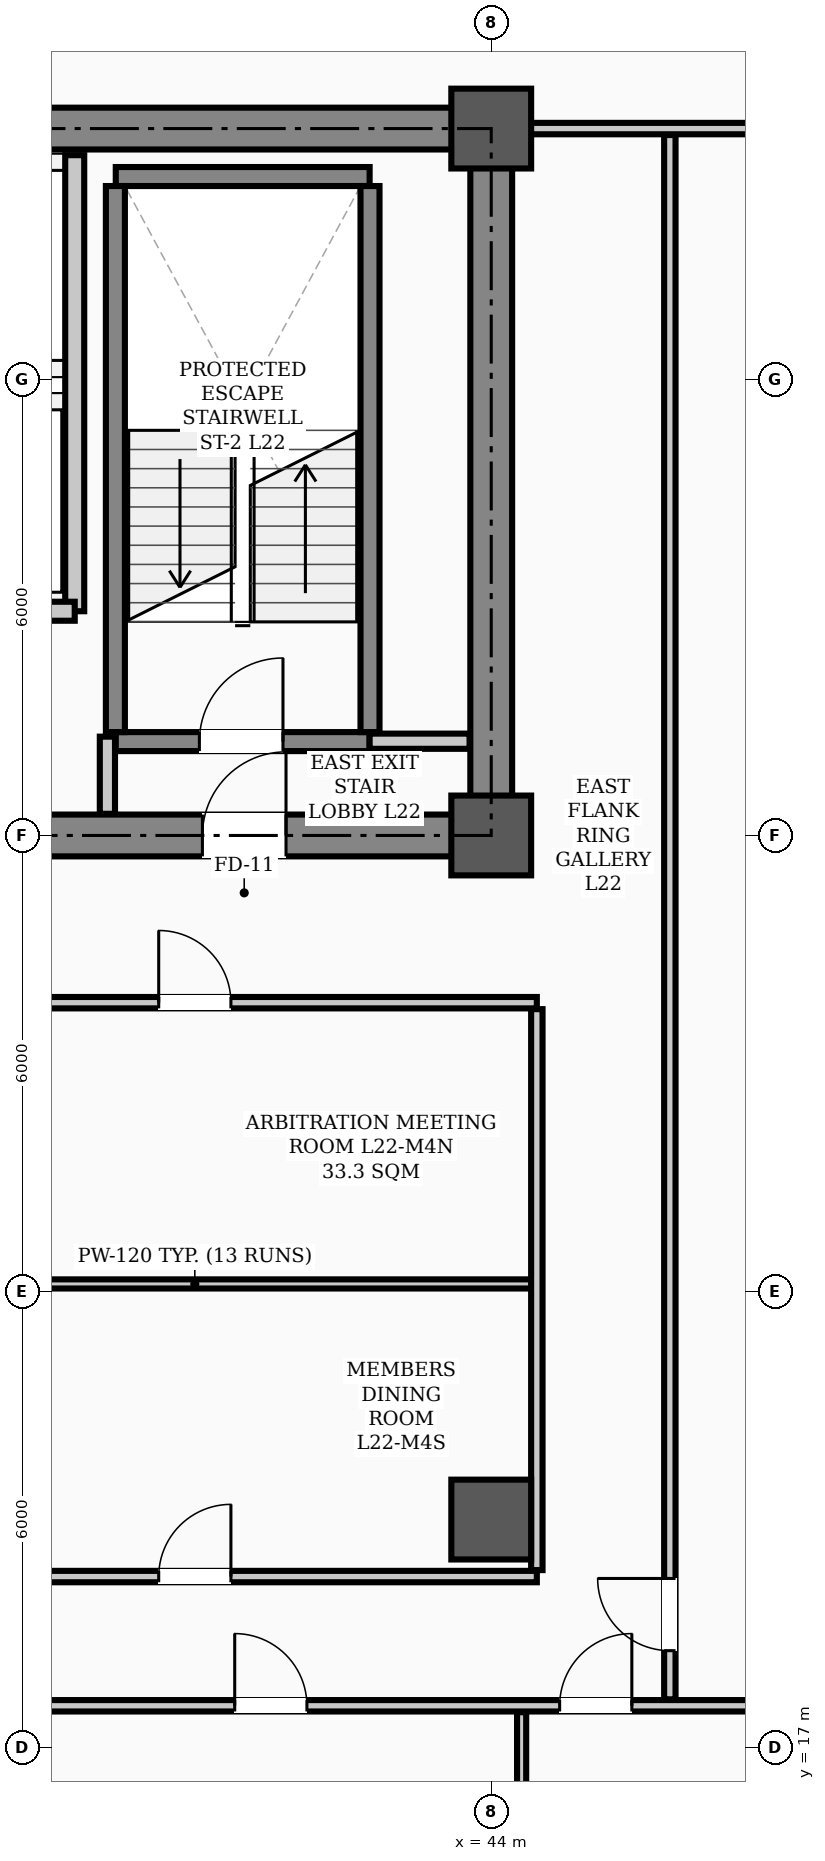
"""IFC4 building model, lengths in metres.
Left out: names, types, materials, properties, quantities, classifications, styles, units other than length and angle.
Written with IfcOpenShell. Run it as: python <this file> out.ifc"""

import sys

from ifc_helpers import new_model, si_unit, direction, frame, frame_2d, origin, origin_2d, place, context, subcontext, project, spatial, rectangle, hollow_rectangle, extrude, element, fill, save


model = new_model("IFC4")
c1 = context("Model", 3, precision=1e-05, world=origin(), true_north=direction((0.0, 1.0)))
c2 = subcontext(c1, "Body", "Model", "MODEL_VIEW")
j1 = project(units=[si_unit("LENGTHUNIT", "METRE"), si_unit("PLANEANGLEUNIT", "RADIAN")], contexts=[c1])
p1 = place(None, origin())
s1 = spatial("IfcSite", under=j1, at=p1, CompositionType="ELEMENT")
p2 = place(p1, origin())
s2 = spatial("IfcBuilding", under=s1, at=p2, CompositionType="ELEMENT")
p3 = place(p2, frame((0.0, 0.0, 88.9)))
s3 = spatial("IfcBuildingStorey", under=s2, at=p3, CompositionType="ELEMENT", Elevation=88.9)
for number, where, z_axis, x_axis in (
    (1, (44.0, 29.0, 0.0), (0.0, 0.0, 1.0), (1.0, 0.0, 0.0)),
    (2, (44.0, 38.3, 0.0), (0.0, 0.0, 1.0), (1.0, 0.0, 0.0)),
    (3, (44.0, 20.0, 0.0), (0.0, 0.0, 1.0), (1.0, 0.0, 0.0)),
):
    element("IfcColumn", number, at=place(p3, frame(where, z_axis=z_axis, x_axis=x_axis)), inside=s3, PredefinedType="COLUMN", context=c2, shape_type="SweptSolid", body=[
        extrude(hollow_rectangle(XDim=1.05, YDim=1.05, WallThickness=0.038, InnerFilletRadius=0.019, OuterFilletRadius=0.057, at=origin_2d()), origin(), (0.0, 0.0, 1.0), 3.9),
    ])
p4 = place(p3, frame((13.5, 29.0, 0.0), z_axis=(0.0, 0.0, 1.0), x_axis=(1.0, 0.0, 0.0)))
e4 = element("IfcWall", 4, at=p4, inside=s3, PredefinedType="SHEAR", context=c2, shape_type="SweptSolid", body=[
    extrude(rectangle(XDim=30.5, YDim=0.55, at=frame_2d((15.25, 0.0))), origin(), (0.0, 0.0, 1.0), 3.72),
])
p5 = place(p4, frame((1.75, 0.0, 0.0)))
e5 = element("IfcOpeningElement", 5, at=p5, cuts=e4, PredefinedType="OPENING", context=c2, shape_type="SweptSolid", body=[
    extrude(rectangle(XDim=1.1, YDim=2.08, at=frame_2d((0.55, 1.04))), frame((0.0, 0.285, 0.0), z_axis=(0.0, -1.0, 0.0), x_axis=(1.0, 0.0, 0.0)), (0.0, 0.0, 1.0), 0.57),
])
p6 = place(p4, frame((26.7, 0.0, 0.0)))
e6 = element("IfcOpeningElement", 6, at=p6, cuts=e4, PredefinedType="OPENING", context=c2, shape_type="SweptSolid", body=[
    extrude(rectangle(XDim=1.1, YDim=2.08, at=frame_2d((0.55, 1.04))), frame((0.0, 0.285, 0.0), z_axis=(0.0, -1.0, 0.0), x_axis=(1.0, 0.0, 0.0)), (0.0, 0.0, 1.0), 0.57),
])
p7 = place(p4, frame((6.8, 0.0, 0.0)))
e7 = element("IfcOpeningElement", 7, at=p7, cuts=e4, PredefinedType="OPENING", context=c2, shape_type="SweptSolid", body=[
    extrude(rectangle(XDim=1.1, YDim=2.08, at=frame_2d((0.55, 1.04))), frame((0.0, 0.285, 0.0), z_axis=(0.0, -1.0, 0.0), x_axis=(1.0, 0.0, 0.0)), (0.0, 0.0, 1.0), 0.57),
])
p8 = place(p4, frame((13.2, 0.0, 0.0)))
e8 = element("IfcOpeningElement", 8, at=p8, cuts=e4, PredefinedType="OPENING", context=c2, shape_type="SweptSolid", body=[
    extrude(rectangle(XDim=1.6, YDim=2.08, at=frame_2d((0.8, 1.04))), frame((0.0, 0.285, 0.0), z_axis=(0.0, -1.0, 0.0), x_axis=(1.0, 0.0, 0.0)), (0.0, 0.0, 1.0), 0.57),
])
p9 = place(p4, frame((20.525, 0.0, 0.0)))
e9 = element("IfcOpeningElement", 9, at=p9, cuts=e4, PredefinedType="OPENING", context=c2, shape_type="SweptSolid", body=[
    extrude(rectangle(XDim=0.95, YDim=2.08, at=frame_2d((0.475, 1.04))), frame((0.0, 0.285, 0.0), z_axis=(0.0, -1.0, 0.0), x_axis=(1.0, 0.0, 0.0)), (0.0, 0.0, 1.0), 0.57),
])
p10 = place(p3, frame((13.5, 38.3, 0.0), z_axis=(0.0, 0.0, 1.0), x_axis=(1.0, 0.0, 0.0)))
e10 = element("IfcWall", 10, at=p10, inside=s3, PredefinedType="SHEAR", context=c2, shape_type="SweptSolid", body=[
    extrude(rectangle(XDim=30.5, YDim=0.55, at=frame_2d((15.25, 0.0))), origin(), (0.0, 0.0, 1.0), 3.72),
])
p11 = place(p3, frame((44.0, 29.35, 0.0), z_axis=(0.0, 0.0, 1.0), x_axis=(0.0, 1.0, 0.0)))
e11 = element("IfcWall", 11, at=p11, inside=s3, PredefinedType="SHEAR", context=c2, shape_type="SweptSolid", body=[
    extrude(rectangle(XDim=8.6, YDim=0.55, at=frame_2d((4.3, 0.0))), origin(), (0.0, 0.0, 1.0), 3.72),
])
p12 = place(p3, frame((39.06, 30.235, 0.0), z_axis=(0.0, 0.0, 1.0), x_axis=(1.0, 0.0, 0.0)))
e12 = element("IfcWall", 12, at=p12, inside=s3, PredefinedType="STANDARD", context=c2, shape_type="SweptSolid", body=[
    extrude(rectangle(XDim=3.34, YDim=0.25, at=frame_2d((1.67, 0.0))), origin(), (0.0, 0.0, 1.0), 3.72),
])
p13 = place(p12, frame((1.1, 0.0, 0.0)))
e13 = element("IfcOpeningElement", 13, at=p13, cuts=e12, PredefinedType="OPENING", context=c2, shape_type="SweptSolid", body=[
    extrude(rectangle(XDim=1.1, YDim=2.08, at=frame_2d((0.55, 1.04))), frame((0.0, 0.135, 0.0), z_axis=(0.0, -1.0, 0.0), x_axis=(1.0, 0.0, 0.0)), (0.0, 0.0, 1.0), 0.27),
])
p14 = place(p3, frame((39.06, 37.669, 0.0), z_axis=(0.0, 0.0, 1.0), x_axis=(1.0, 0.0, 0.0)))
e14 = element("IfcWall", 14, at=p14, inside=s3, PredefinedType="STANDARD", context=c2, shape_type="SweptSolid", body=[
    extrude(rectangle(XDim=3.34, YDim=0.25, at=frame_2d((1.67, 0.0))), origin(), (0.0, 0.0, 1.0), 3.72),
])
for number, where, z_axis, x_axis in (
    (15, (39.055, 30.36, 0.0), (0.0, 0.0, 1.0), (0.0, 1.0, 0.0)),
    (16, (42.405, 30.36, 0.0), (0.0, 0.0, 1.0), (0.0, 1.0, 0.0)),
):
    element("IfcWall", number, at=place(p3, frame(where, z_axis=z_axis, x_axis=x_axis)), inside=s3, PredefinedType="STANDARD", context=c2, shape_type="SweptSolid", body=[
        extrude(rectangle(XDim=7.184, YDim=0.25, at=frame_2d((3.592, 0.0))), origin(), (0.0, 0.0, 1.0), 3.72),
    ])
p15 = place(p3, frame((38.52, 31.95, 0.0), z_axis=(0.0, 0.0, 1.0), x_axis=(0.0, 1.0, 0.0)))
e17 = element("IfcWall", 17, at=p15, inside=s3, PredefinedType="STANDARD", context=c2, shape_type="SweptSolid", body=[
    extrude(rectangle(XDim=6.0, YDim=0.25, at=frame_2d((3.0, 0.0))), origin(), (0.0, 0.0, 1.0), 3.3),
])
p16 = place(p3, frame((36.62, 31.95, 0.0), z_axis=(0.0, 0.0, 1.0), x_axis=(1.0, 0.0, 0.0)))
e18 = element("IfcWall", 18, at=p16, inside=s3, PredefinedType="STANDARD", context=c2, shape_type="SweptSolid", body=[
    extrude(rectangle(XDim=1.9, YDim=0.25, at=frame_2d((0.95, 0.0))), origin(), (0.0, 0.0, 1.0), 3.48),
])
p17 = place(p3, frame((42.4, 30.24, 0.0), z_axis=(0.0, 0.0, 1.0), x_axis=(1.0, 0.0, 0.0)))
e19 = element("IfcWall", 19, at=p17, inside=s3, PredefinedType="STANDARD", context=c2, shape_type="SweptSolid", body=[
    extrude(rectangle(XDim=1.315, YDim=0.2, at=frame_2d((0.658, 0.0))), origin(), (0.0, 0.0, 1.0), 3.1),
])
p18 = place(p3, frame((12.9, 26.8, 0.0), z_axis=(0.0, 0.0, 1.0), x_axis=(1.0, 0.0, 0.0)))
e20 = element("IfcWall", 20, at=p18, inside=s3, PredefinedType="PARTITIONING", context=c2, shape_type="SweptSolid", body=[
    extrude(rectangle(XDim=31.7, YDim=0.15, at=frame_2d((15.85, 0.0))), origin(), (0.0, 0.0, 1.0), 3.1),
])
p19 = place(p18, frame((13.6, 0.0, 0.0)))
e21 = element("IfcOpeningElement", 21, at=p19, cuts=e20, PredefinedType="OPENING", context=c2, shape_type="SweptSolid", body=[
    extrude(rectangle(XDim=1.6, YDim=2.08, at=frame_2d((0.8, 1.04))), frame((0.0, 0.085, 0.0), z_axis=(0.0, -1.0, 0.0), x_axis=(1.0, 0.0, 0.0)), (0.0, 0.0, 1.0), 0.17),
])
p20 = place(p18, frame((3.275, 0.0, 0.0)))
e22 = element("IfcOpeningElement", 22, at=p20, cuts=e20, PredefinedType="OPENING", context=c2, shape_type="SweptSolid", body=[
    extrude(rectangle(XDim=0.95, YDim=2.08, at=frame_2d((0.475, 1.04))), frame((0.0, 0.085, 0.0), z_axis=(0.0, -1.0, 0.0), x_axis=(1.0, 0.0, 0.0)), (0.0, 0.0, 1.0), 0.17),
])
p21 = place(p18, frame((9.025, 0.0, 0.0)))
e23 = element("IfcOpeningElement", 23, at=p21, cuts=e20, PredefinedType="OPENING", context=c2, shape_type="SweptSolid", body=[
    extrude(rectangle(XDim=0.95, YDim=2.08, at=frame_2d((0.475, 1.04))), frame((0.0, 0.085, 0.0), z_axis=(0.0, -1.0, 0.0), x_axis=(1.0, 0.0, 0.0)), (0.0, 0.0, 1.0), 0.17),
])
p22 = place(p18, frame((19.525, 0.0, 0.0)))
e24 = element("IfcOpeningElement", 24, at=p22, cuts=e20, PredefinedType="OPENING", context=c2, shape_type="SweptSolid", body=[
    extrude(rectangle(XDim=0.95, YDim=2.08, at=frame_2d((0.475, 1.04))), frame((0.0, 0.085, 0.0), z_axis=(0.0, -1.0, 0.0), x_axis=(1.0, 0.0, 0.0)), (0.0, 0.0, 1.0), 0.17),
])
p23 = place(p18, frame((26.725, 0.0, 0.0)))
e25 = element("IfcOpeningElement", 25, at=p23, cuts=e20, PredefinedType="OPENING", context=c2, shape_type="SweptSolid", body=[
    extrude(rectangle(XDim=0.95, YDim=2.08, at=frame_2d((0.475, 1.04))), frame((0.0, 0.085, 0.0), z_axis=(0.0, -1.0, 0.0), x_axis=(1.0, 0.0, 0.0)), (0.0, 0.0, 1.0), 0.17),
])
p24 = place(p3, frame((7.81, 17.55, 0.0), z_axis=(0.0, 0.0, 1.0), x_axis=(1.0, 0.0, 0.0)))
e26 = element("IfcWall", 26, at=p24, inside=s3, PredefinedType="PARTITIONING", context=c2, shape_type="SweptSolid", body=[
    extrude(rectangle(XDim=49.38, YDim=0.15, at=frame_2d((24.69, 0.0))), origin(), (0.0, 0.0, 1.0), 3.1),
])
p25 = place(p24, frame((7.465, 0.0, 0.0)))
e27 = element("IfcOpeningElement", 27, at=p25, cuts=e26, PredefinedType="OPENING", context=c2, shape_type="SweptSolid", body=[
    extrude(rectangle(XDim=0.95, YDim=2.08, at=frame_2d((0.475, 1.04))), frame((0.0, 0.085, 0.0), z_axis=(0.0, -1.0, 0.0), x_axis=(1.0, 0.0, 0.0)), (0.0, 0.0, 1.0), 0.17),
])
p26 = place(p24, frame((11.915, 0.0, 0.0)))
e28 = element("IfcOpeningElement", 28, at=p26, cuts=e26, PredefinedType="OPENING", context=c2, shape_type="SweptSolid", body=[
    extrude(rectangle(XDim=0.95, YDim=2.08, at=frame_2d((0.475, 1.04))), frame((0.0, 0.085, 0.0), z_axis=(0.0, -1.0, 0.0), x_axis=(1.0, 0.0, 0.0)), (0.0, 0.0, 1.0), 0.17),
])
p27 = place(p24, frame((18.915, 0.0, 0.0)))
e29 = element("IfcOpeningElement", 29, at=p27, cuts=e26, PredefinedType="OPENING", context=c2, shape_type="SweptSolid", body=[
    extrude(rectangle(XDim=0.95, YDim=2.08, at=frame_2d((0.475, 1.04))), frame((0.0, 0.085, 0.0), z_axis=(0.0, -1.0, 0.0), x_axis=(1.0, 0.0, 0.0)), (0.0, 0.0, 1.0), 0.17),
])
p28 = place(p24, frame((26.015, 0.0, 0.0)))
e30 = element("IfcOpeningElement", 30, at=p28, cuts=e26, PredefinedType="OPENING", context=c2, shape_type="SweptSolid", body=[
    extrude(rectangle(XDim=0.95, YDim=2.08, at=frame_2d((0.475, 1.04))), frame((0.0, 0.085, 0.0), z_axis=(0.0, -1.0, 0.0), x_axis=(1.0, 0.0, 0.0)), (0.0, 0.0, 1.0), 0.17),
])
p29 = place(p24, frame((32.815, 0.0, 0.0)))
e31 = element("IfcOpeningElement", 31, at=p29, cuts=e26, PredefinedType="OPENING", context=c2, shape_type="SweptSolid", body=[
    extrude(rectangle(XDim=0.95, YDim=2.08, at=frame_2d((0.475, 1.04))), frame((0.0, 0.085, 0.0), z_axis=(0.0, -1.0, 0.0), x_axis=(1.0, 0.0, 0.0)), (0.0, 0.0, 1.0), 0.17),
])
p30 = place(p24, frame((37.09, 0.0, 0.0)))
e32 = element("IfcOpeningElement", 32, at=p30, cuts=e26, PredefinedType="OPENING", context=c2, shape_type="SweptSolid", body=[
    extrude(rectangle(XDim=0.95, YDim=2.08, at=frame_2d((0.475, 1.04))), frame((0.0, 0.085, 0.0), z_axis=(0.0, -1.0, 0.0), x_axis=(1.0, 0.0, 0.0)), (0.0, 0.0, 1.0), 0.17),
])
p31 = place(p3, frame((28.4, 19.25, 0.0), z_axis=(0.0, 0.0, 1.0), x_axis=(1.0, 0.0, 0.0)))
e33 = element("IfcWall", 33, at=p31, inside=s3, PredefinedType="PARTITIONING", context=c2, shape_type="SweptSolid", body=[
    extrude(rectangle(XDim=16.2, YDim=0.15, at=frame_2d((8.1, 0.0))), origin(), (0.0, 0.0, 1.0), 3.1),
])
p32 = place(p31, frame((4.025, 0.0, 0.0)))
e34 = element("IfcOpeningElement", 34, at=p32, cuts=e33, PredefinedType="OPENING", context=c2, shape_type="SweptSolid", body=[
    extrude(rectangle(XDim=0.95, YDim=2.08, at=frame_2d((0.475, 1.04))), frame((0.0, 0.085, 0.0), z_axis=(0.0, -1.0, 0.0), x_axis=(1.0, 0.0, 0.0)), (0.0, 0.0, 1.0), 0.17),
])
p33 = place(p31, frame((11.225, 0.0, 0.0)))
e35 = element("IfcOpeningElement", 35, at=p33, cuts=e33, PredefinedType="OPENING", context=c2, shape_type="SweptSolid", body=[
    extrude(rectangle(XDim=0.95, YDim=2.08, at=frame_2d((0.475, 1.04))), frame((0.0, 0.085, 0.0), z_axis=(0.0, -1.0, 0.0), x_axis=(1.0, 0.0, 0.0)), (0.0, 0.0, 1.0), 0.17),
])
p34 = place(p3, frame((44.0, 38.3, 0.0), z_axis=(0.0, 0.0, 1.0), x_axis=(1.0, 0.0, 0.0)))
e36 = element("IfcWall", 36, at=p34, inside=s3, PredefinedType="PARTITIONING", context=c2, shape_type="SweptSolid", body=[
    extrude(rectangle(XDim=13.19, YDim=0.15, at=frame_2d((6.595, 0.0))), origin(), (0.0, 0.0, 1.0), 3.0),
])
p35 = place(p3, frame((35.6, 23.1, 0.0), z_axis=(0.0, 0.0, 1.0), x_axis=(1.0, 0.0, 0.0)))
e37 = element("IfcWall", 37, at=p35, inside=s3, PredefinedType="PARTITIONING", context=c2, shape_type="SweptSolid", body=[
    extrude(rectangle(XDim=9.0, YDim=0.12, at=frame_2d((4.5, 0.0))), origin(), (0.0, 0.0, 1.0), 3.1),
])
p36 = place(p3, frame((38.95, 29.285, 0.0), z_axis=(0.0, 0.0, 1.0), x_axis=(0.0, 1.0, 0.0)))
e38 = element("IfcWall", 38, at=p36, inside=s3, PredefinedType="STANDARD", context=c2, shape_type="SweptSolid", body=[
    extrude(rectangle(XDim=1.015, YDim=0.2, at=frame_2d((0.508, 0.0))), origin(), (0.0, 0.0, 1.0), 3.3),
])
p37 = place(p3, frame((46.35, 17.635, 0.0), z_axis=(0.0, 0.0, 1.0), x_axis=(0.0, 1.0, 0.0)))
e39 = element("IfcWall", 39, at=p37, inside=s3, PredefinedType="PARTITIONING", context=c2, shape_type="SweptSolid", body=[
    extrude(rectangle(XDim=20.58, YDim=0.15, at=frame_2d((10.29, 0.0))), origin(), (0.0, 0.0, 1.0), 3.0),
])
p38 = place(p37, frame((0.64, 0.0, 0.0)))
e40 = element("IfcOpeningElement", 40, at=p38, cuts=e39, PredefinedType="OPENING", context=c2, shape_type="SweptSolid", body=[
    extrude(rectangle(XDim=0.95, YDim=2.08, at=frame_2d((0.475, 1.04))), frame((0.0, 0.085, 0.0), z_axis=(0.0, -1.0, 0.0), x_axis=(1.0, 0.0, 0.0)), (0.0, 0.0, 1.0), 0.17),
])
p39 = place(p3, frame((44.6, 19.335, 0.0), z_axis=(0.0, 0.0, 1.0), x_axis=(0.0, 1.0, 0.0)))
e41 = element("IfcWall", 41, at=p39, inside=s3, PredefinedType="PARTITIONING", context=c2, shape_type="SweptSolid", body=[
    extrude(rectangle(XDim=7.38, YDim=0.15, at=frame_2d((3.69, 0.0))), origin(), (0.0, 0.0, 1.0), 3.0),
])
p40 = place(p3, frame((44.4, 9.81, 0.0), z_axis=(0.0, 0.0, 1.0), x_axis=(0.0, 1.0, 0.0)))
e42 = element("IfcWall", 42, at=p40, inside=s3, PredefinedType="PARTITIONING", context=c2, shape_type="SweptSolid", body=[
    extrude(rectangle(XDim=7.655, YDim=0.12, at=frame_2d((3.828, 0.0))), origin(), (0.0, 0.0, 1.0), 3.1),
])
p41 = place(p13, origin())
e43 = element("IfcDoor", 43, at=p41, inside=s3, OperationType="SINGLE_SWING_RIGHT", PredefinedType="DOOR", context=c2, shape_type="SweptSolid", body=[
    extrude(rectangle(XDim=1.1, YDim=2.08, at=frame_2d((0.55, 1.04))), frame((0.0, 0.025, 0.0), z_axis=(0.0, -1.0, 0.0), x_axis=(1.0, 0.0, 0.0)), (0.0, 0.0, 1.0), 0.05),
])
fill(e13, e43)
p42 = place(p6, origin())
e44 = element("IfcDoor", 44, at=p42, inside=s3, OperationType="SINGLE_SWING_RIGHT", PredefinedType="DOOR", context=c2, shape_type="SweptSolid", body=[
    extrude(rectangle(XDim=1.1, YDim=2.08, at=frame_2d((0.55, 1.04))), frame((0.0, 0.025, 0.0), z_axis=(0.0, -1.0, 0.0), x_axis=(1.0, 0.0, 0.0)), (0.0, 0.0, 1.0), 0.05),
])
fill(e6, e44)
p43 = place(p29, origin())
e45 = element("IfcDoor", 45, at=p43, inside=s3, OperationType="SINGLE_SWING_LEFT", PredefinedType="DOOR", context=c2, shape_type="SweptSolid", body=[
    extrude(rectangle(XDim=0.95, YDim=2.08, at=frame_2d((0.475, 1.04))), frame((0.0, 0.025, 0.0), z_axis=(0.0, -1.0, 0.0), x_axis=(1.0, 0.0, 0.0)), (0.0, 0.0, 1.0), 0.05),
])
fill(e31, e45)
p44 = place(p30, origin())
e46 = element("IfcDoor", 46, at=p44, inside=s3, OperationType="SINGLE_SWING_RIGHT", PredefinedType="DOOR", context=c2, shape_type="SweptSolid", body=[
    extrude(rectangle(XDim=0.95, YDim=2.08, at=frame_2d((0.475, 1.04))), frame((0.0, 0.025, 0.0), z_axis=(0.0, -1.0, 0.0), x_axis=(1.0, 0.0, 0.0)), (0.0, 0.0, 1.0), 0.05),
])
fill(e32, e46)
p45 = place(p23, origin())
e47 = element("IfcDoor", 47, at=p45, inside=s3, OperationType="SINGLE_SWING_LEFT", PredefinedType="DOOR", context=c2, shape_type="SweptSolid", body=[
    extrude(rectangle(XDim=0.95, YDim=2.08, at=frame_2d((0.475, 1.04))), frame((0.0, 0.025, 0.0), z_axis=(0.0, -1.0, 0.0), x_axis=(1.0, 0.0, 0.0)), (0.0, 0.0, 1.0), 0.05),
])
fill(e25, e47)
p46 = place(p33, origin())
e48 = element("IfcDoor", 48, at=p46, inside=s3, OperationType="SINGLE_SWING_RIGHT", PredefinedType="DOOR", context=c2, shape_type="SweptSolid", body=[
    extrude(rectangle(XDim=0.95, YDim=2.08, at=frame_2d((0.475, 1.04))), frame((0.0, 0.025, 0.0), z_axis=(0.0, -1.0, 0.0), x_axis=(1.0, 0.0, 0.0)), (0.0, 0.0, 1.0), 0.05),
])
fill(e35, e48)
p47 = place(p38, origin())
e49 = element("IfcDoor", 49, at=p47, inside=s3, OperationType="SINGLE_SWING_RIGHT", PredefinedType="DOOR", context=c2, shape_type="SweptSolid", body=[
    extrude(rectangle(XDim=0.95, YDim=2.08, at=frame_2d((0.475, 1.04))), frame((0.0, 0.025, 0.0), z_axis=(0.0, -1.0, 0.0), x_axis=(1.0, 0.0, 0.0)), (0.0, 0.0, 1.0), 0.05),
])
fill(e40, e49)
save(model, sys.argv[1])
